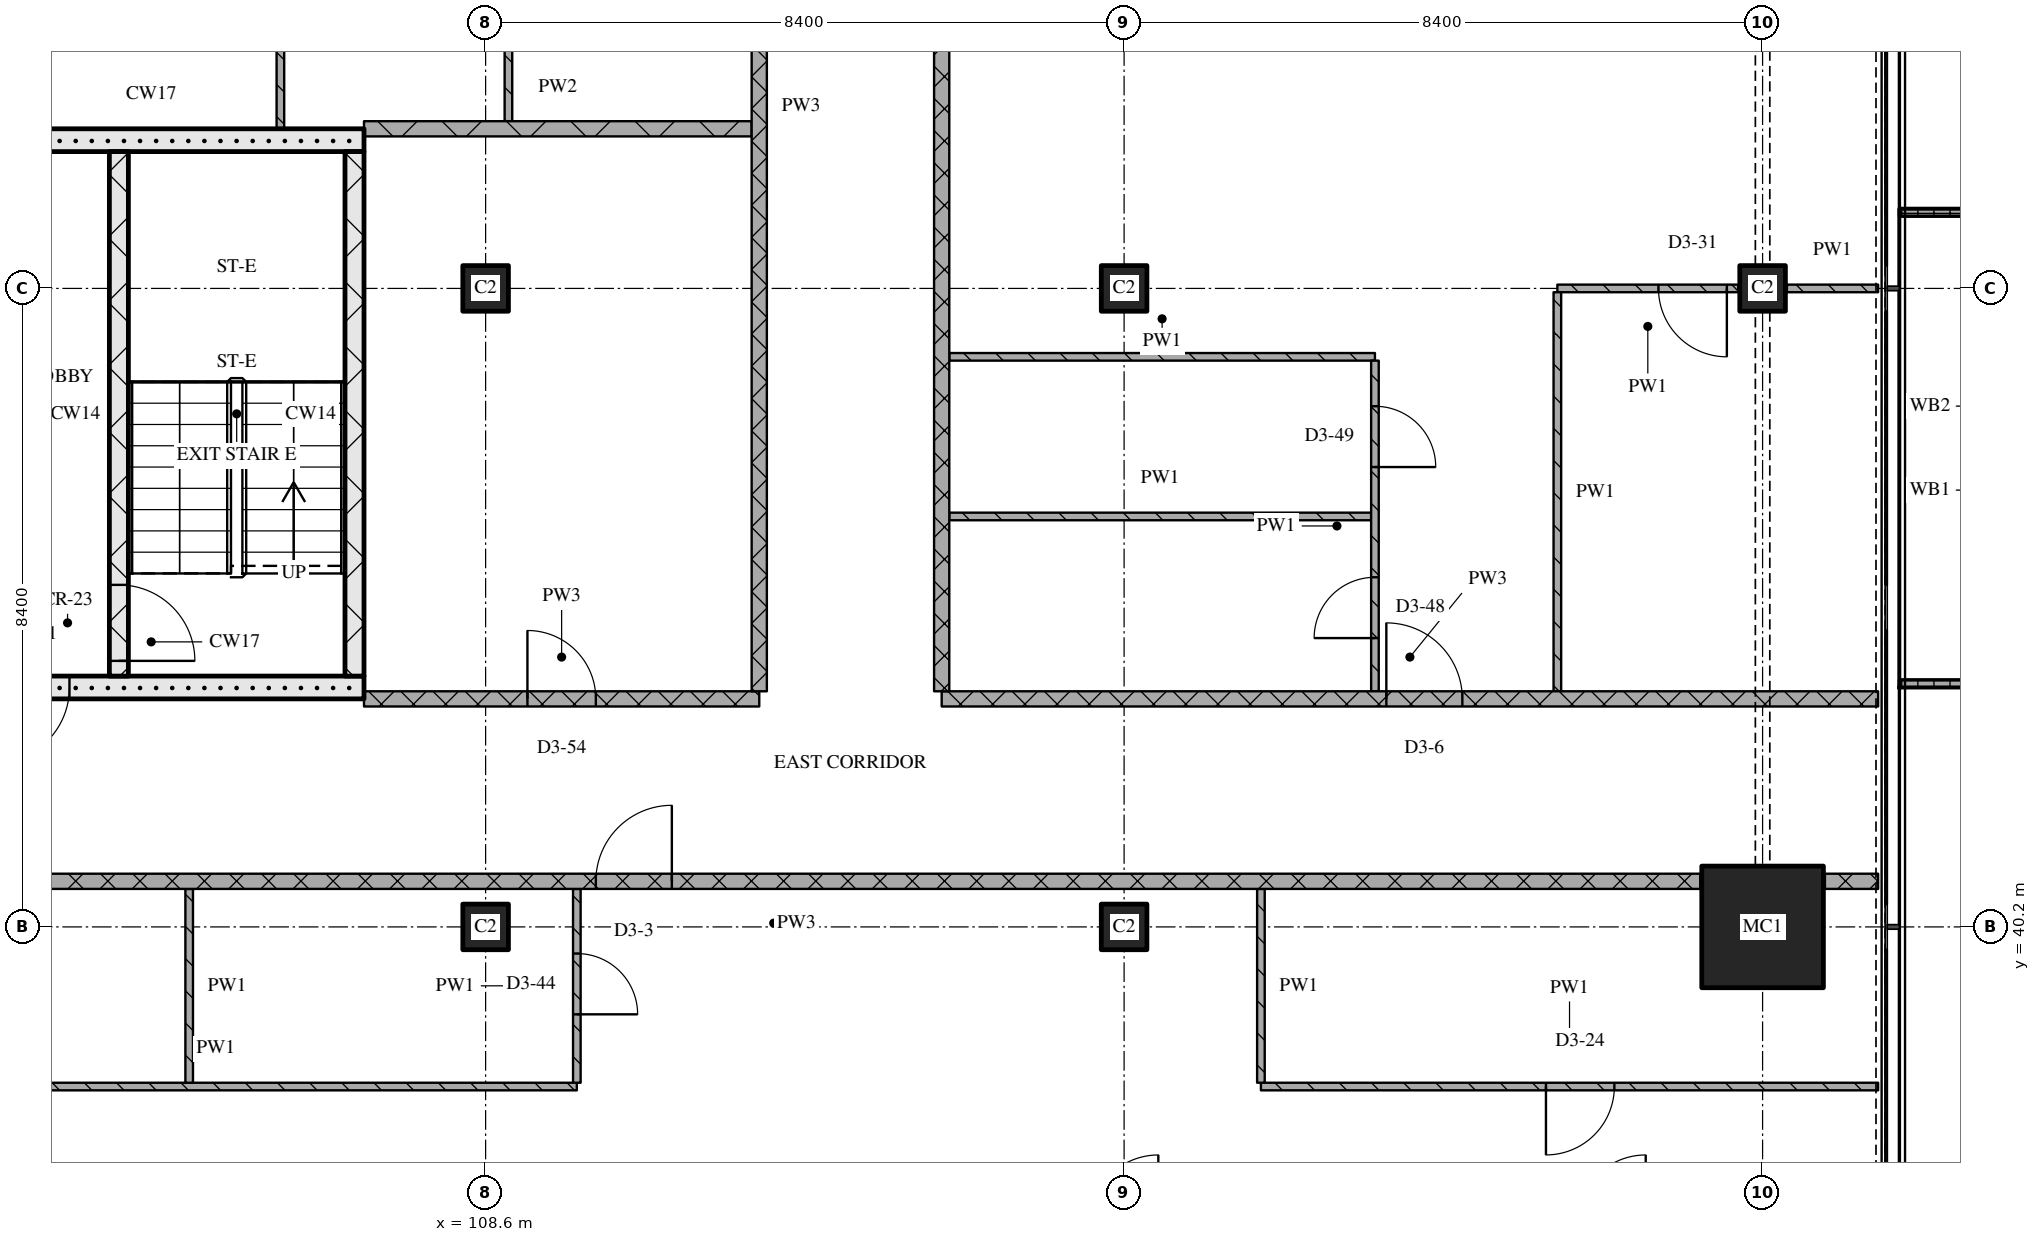
"""IFC4 building model, lengths in metres.
Left out: names, types, materials, properties, quantities, classifications, styles, units other than length and angle.
Written with IfcOpenShell. Run it as: python <this file> out.ifc"""

import sys

from ifc_helpers import new_model, si_unit, direction, frame, frame_2d, origin, origin_2d, place, context, subcontext, project, spatial, polyline, rectangle, outline, extrude, element, fill, save


model = new_model("IFC4")
c1 = context("Model", 3, precision=1e-05, world=origin(), true_north=direction((0.0, 1.0)))
c2 = subcontext(c1, "Body", "Model", "MODEL_VIEW")
j1 = project(units=[si_unit("LENGTHUNIT", "METRE"), si_unit("PLANEANGLEUNIT", "RADIAN")], contexts=[c1])
p1 = place(None, origin())
s1 = spatial("IfcSite", under=j1, at=p1, CompositionType="ELEMENT")
p2 = place(p1, origin())
s2 = spatial("IfcBuilding", under=s1, at=p2, CompositionType="ELEMENT")
p3 = place(p2, frame((0.0, 0.0, 234.3)))
s3 = spatial("IfcBuildingStorey", under=s2, at=p3, CompositionType="ELEMENT", Elevation=234.3)
for number, where, z_axis, x_axis in (
    (1, (108.6, 40.2, 0.0), (0.0, 0.0, 1.0), (1.0, 0.0, 0.0)),
    (2, (108.6, 48.6, 0.0), (0.0, 0.0, 1.0), (1.0, 0.0, 0.0)),
    (3, (117.0, 40.2, 0.0), (0.0, 0.0, 1.0), (1.0, 0.0, 0.0)),
    (4, (117.0, 48.6, 0.0), (0.0, 0.0, 1.0), (1.0, 0.0, 0.0)),
):
    element("IfcColumn", number, at=place(p3, frame(where, z_axis=z_axis, x_axis=x_axis)), inside=s3, PredefinedType="COLUMN", context=c2, shape_type="SweptSolid", body=[
        extrude(rectangle(XDim=0.6, YDim=0.6, at=origin_2d()), origin(), (0.0, 0.0, 1.0), 3.6),
    ])
p4 = place(p3, frame((125.4, 40.2, 0.0), z_axis=(0.0, 0.0, 1.0), x_axis=(1.0, 0.0, 0.0)))
e5 = element("IfcColumn", 5, at=p4, inside=s3, PredefinedType="COLUMN", context=c2, shape_type="SweptSolid", body=[
    extrude(rectangle(XDim=1.6, YDim=1.6, at=origin_2d()), origin(), (0.0, 0.0, 1.0), 3.6),
])
p5 = place(p3, frame((125.4, 48.6, 0.0), z_axis=(0.0, 0.0, 1.0), x_axis=(1.0, 0.0, 0.0)))
e6 = element("IfcColumn", 6, at=p5, inside=s3, PredefinedType="COLUMN", context=c2, shape_type="SweptSolid", body=[
    extrude(rectangle(XDim=0.6, YDim=0.6, at=origin_2d()), origin(), (0.0, 0.0, 1.0), 3.6),
])
p6 = place(p3, origin())
e7 = element("IfcWall", 7, at=p6, inside=s3, PredefinedType="SOLIDWALL", context=c2, shape_type="SweptSolid", body=[
    extrude(outline(polyline([(127.2, 43.35), (127.2, 43.45), (128.967, 43.45), (128.967, 49.55), (127.2, 49.55), (127.2, 49.65), (129.067, 49.65), (129.067, 43.35), (127.2, 43.35)])), origin(), (0.0, 0.0, 1.0), 1.0),
])
p7 = place(p3, frame((101.4, 43.35, 0.0), z_axis=(0.0, 0.0, 1.0), x_axis=(1.0, 0.0, 0.0)))
e8 = element("IfcWall", 8, at=p7, inside=s3, PredefinedType="SOLIDWALL", context=c2, shape_type="SweptSolid", body=[
    extrude(rectangle(XDim=5.6, YDim=0.3, at=frame_2d((2.8, 0.0))), origin(), (0.0, 0.0, 1.0), 3.32),
])
p8 = place(p7, frame((0.725, 0.0, 0.0)))
e9 = element("IfcOpeningElement", 9, at=p8, cuts=e8, PredefinedType="OPENING", context=c2, shape_type="SweptSolid", body=[
    extrude(rectangle(XDim=1.0, YDim=2.1, at=frame_2d((0.5, 1.05))), frame((0.0, 0.16, 0.0), z_axis=(0.0, -1.0, 0.0), x_axis=(1.0, 0.0, 0.0)), (0.0, 0.0, 1.0), 0.32),
])
p9 = place(p3, frame((103.775, 43.5, 0.0), z_axis=(0.0, 0.0, 1.0), x_axis=(0.0, 1.0, 0.0)))
e10 = element("IfcWall", 10, at=p9, inside=s3, PredefinedType="SOLIDWALL", context=c2, shape_type="SweptSolid", body=[
    extrude(rectangle(XDim=6.9, YDim=0.25, at=frame_2d((3.45, 0.0))), origin(), (0.0, 0.0, 1.0), 3.32),
])
p10 = place(p9, frame((0.2, 0.0, 0.0)))
e11 = element("IfcOpeningElement", 11, at=p10, cuts=e10, PredefinedType="OPENING", context=c2, shape_type="SweptSolid", body=[
    extrude(rectangle(XDim=1.0, YDim=2.1, at=frame_2d((0.5, 1.05))), frame((0.0, 0.135, 0.0), z_axis=(0.0, -1.0, 0.0), x_axis=(1.0, 0.0, 0.0)), (0.0, 0.0, 1.0), 0.27),
])
p11 = place(p3, frame((106.875, 43.5, 0.0), z_axis=(0.0, 0.0, 1.0), x_axis=(0.0, 1.0, 0.0)))
e12 = element("IfcWall", 12, at=p11, inside=s3, PredefinedType="SOLIDWALL", context=c2, shape_type="SweptSolid", body=[
    extrude(rectangle(XDim=6.9, YDim=0.25, at=frame_2d((3.45, 0.0))), origin(), (0.0, 0.0, 1.0), 3.32),
])
p12 = place(p3, frame((101.4, 50.55, 0.0), z_axis=(0.0, 0.0, 1.0), x_axis=(1.0, 0.0, 0.0)))
e13 = element("IfcWall", 13, at=p12, inside=s3, PredefinedType="SOLIDWALL", context=c2, shape_type="SweptSolid", body=[
    extrude(rectangle(XDim=5.6, YDim=0.3, at=frame_2d((2.8, 0.0))), origin(), (0.0, 0.0, 1.0), 3.32),
])
p13 = place(p3, frame((100.3, 38.1, 0.0), z_axis=(0.0, 0.0, 1.0), x_axis=(1.0, 0.0, 0.0)))
e14 = element("IfcWall", 14, at=p13, inside=s3, PredefinedType="PARTITIONING", context=c2, shape_type="SweptSolid", body=[
    extrude(rectangle(XDim=9.5, YDim=0.1, at=frame_2d((4.75, 0.0))), origin(), (0.0, 0.0, 1.0), 3.32),
])
p14 = place(p13, frame((1.75, 0.0, 0.0)))
e15 = element("IfcOpeningElement", 15, at=p14, cuts=e14, PredefinedType="OPENING", context=c2, shape_type="SweptSolid", body=[
    extrude(rectangle(XDim=0.8, YDim=2.1, at=frame_2d((0.4, 1.05))), frame((0.0, 0.06, 0.0), z_axis=(0.0, -1.0, 0.0), x_axis=(1.0, 0.0, 0.0)), (0.0, 0.0, 1.0), 0.12),
])
p15 = place(p3, frame((118.8, 38.1, 0.0), z_axis=(0.0, 0.0, 1.0), x_axis=(1.0, 0.0, 0.0)))
e16 = element("IfcWall", 16, at=p15, inside=s3, PredefinedType="PARTITIONING", context=c2, shape_type="SweptSolid", body=[
    extrude(rectangle(XDim=8.12, YDim=0.1, at=frame_2d((4.06, 0.0))), origin(), (0.0, 0.0, 1.0), 3.32),
])
p16 = place(p15, frame((3.75, 0.0, 0.0)))
e17 = element("IfcOpeningElement", 17, at=p16, cuts=e16, PredefinedType="OPENING", context=c2, shape_type="SweptSolid", body=[
    extrude(rectangle(XDim=0.9, YDim=2.1, at=frame_2d((0.45, 1.05))), frame((0.0, 0.06, 0.0), z_axis=(0.0, -1.0, 0.0), x_axis=(1.0, 0.0, 0.0)), (0.0, 0.0, 1.0), 0.12),
])
p17 = place(p3, frame((124.58, 40.8, 0.0), z_axis=(0.0, 0.0, 1.0), x_axis=(-1.0, 0.0, 0.0)))
e18 = element("IfcWall", 18, at=p17, inside=s3, PredefinedType="PARTITIONING", context=c2, shape_type="SweptSolid", body=[
    extrude(rectangle(XDim=24.38, YDim=0.2, at=frame_2d((12.19, 0.0))), origin(), (0.0, 0.0, 1.0), 3.32),
])
p18 = place(p17, frame((13.53, 0.0, 0.0)))
e19 = element("IfcOpeningElement", 19, at=p18, cuts=e18, PredefinedType="OPENING", context=c2, shape_type="SweptSolid", body=[
    extrude(rectangle(XDim=1.0, YDim=2.1, at=frame_2d((0.5, 1.05))), frame((0.0, 0.11, 0.0), z_axis=(0.0, -1.0, 0.0), x_axis=(1.0, 0.0, 0.0)), (0.0, 0.0, 1.0), 0.22),
])
p19 = place(p3, frame((126.22, 40.8, 0.0), z_axis=(0.0, 0.0, 1.0), x_axis=(1.0, 0.0, 0.0)))
e20 = element("IfcWall", 20, at=p19, inside=s3, PredefinedType="PARTITIONING", context=c2, shape_type="SweptSolid", body=[
    extrude(rectangle(XDim=0.7, YDim=0.2, at=frame_2d((0.35, 0.0))), origin(), (0.0, 0.0, 1.0), 3.32),
])
p20 = place(p3, frame((107.0, 43.2, 0.0), z_axis=(0.0, 0.0, 1.0), x_axis=(1.0, 0.0, 0.0)))
e21 = element("IfcWall", 21, at=p20, inside=s3, PredefinedType="PARTITIONING", context=c2, shape_type="SweptSolid", body=[
    extrude(rectangle(XDim=5.2, YDim=0.2, at=frame_2d((2.6, 0.0))), origin(), (0.0, 0.0, 1.0), 3.32),
])
p21 = place(p20, frame((2.15, 0.0, 0.0)))
e22 = element("IfcOpeningElement", 22, at=p21, cuts=e21, PredefinedType="OPENING", context=c2, shape_type="SweptSolid", body=[
    extrude(rectangle(XDim=0.9, YDim=2.1, at=frame_2d((0.45, 1.05))), frame((0.0, 0.11, 0.0), z_axis=(0.0, -1.0, 0.0), x_axis=(1.0, 0.0, 0.0)), (0.0, 0.0, 1.0), 0.22),
])
p22 = place(p3, frame((114.6, 43.2, 0.0), z_axis=(0.0, 0.0, 1.0), x_axis=(1.0, 0.0, 0.0)))
e23 = element("IfcWall", 23, at=p22, inside=s3, PredefinedType="PARTITIONING", context=c2, shape_type="SweptSolid", body=[
    extrude(rectangle(XDim=12.32, YDim=0.2, at=frame_2d((6.16, 0.0))), origin(), (0.0, 0.0, 1.0), 3.32),
])
p23 = place(p22, frame((5.85, 0.0, 0.0)))
e24 = element("IfcOpeningElement", 24, at=p23, cuts=e23, PredefinedType="OPENING", context=c2, shape_type="SweptSolid", body=[
    extrude(rectangle(XDim=1.0, YDim=2.1, at=frame_2d((0.5, 1.05))), frame((0.0, 0.11, 0.0), z_axis=(0.0, -1.0, 0.0), x_axis=(1.0, 0.0, 0.0)), (0.0, 0.0, 1.0), 0.22),
])
p24 = place(p3, frame((114.7, 45.6, 0.0), z_axis=(0.0, 0.0, 1.0), x_axis=(1.0, 0.0, 0.0)))
e25 = element("IfcWall", 25, at=p24, inside=s3, PredefinedType="PARTITIONING", context=c2, shape_type="SweptSolid", body=[
    extrude(rectangle(XDim=5.55, YDim=0.1, at=frame_2d((2.775, 0.0))), origin(), (0.0, 0.0, 1.0), 3.32),
])
p25 = place(p3, frame((114.7, 47.7, 0.0), z_axis=(0.0, 0.0, 1.0), x_axis=(1.0, 0.0, 0.0)))
e26 = element("IfcWall", 26, at=p25, inside=s3, PredefinedType="PARTITIONING", context=c2, shape_type="SweptSolid", body=[
    extrude(rectangle(XDim=5.6, YDim=0.1, at=frame_2d((2.8, 0.0))), origin(), (0.0, 0.0, 1.0), 3.32),
])
p26 = place(p3, frame((125.08, 48.6, 0.0), z_axis=(0.0, 0.0, 1.0), x_axis=(-1.0, 0.0, 0.0)))
e27 = element("IfcWall", 27, at=p26, inside=s3, PredefinedType="PARTITIONING", context=c2, shape_type="SweptSolid", body=[
    extrude(rectangle(XDim=2.38, YDim=0.1, at=frame_2d((1.19, 0.0))), origin(), (0.0, 0.0, 1.0), 3.32),
])
p27 = place(p26, frame((0.15, 0.0, 0.0)))
e28 = element("IfcOpeningElement", 28, at=p27, cuts=e27, PredefinedType="OPENING", context=c2, shape_type="SweptSolid", body=[
    extrude(rectangle(XDim=0.9, YDim=2.1, at=frame_2d((0.45, 1.05))), frame((0.0, 0.06, 0.0), z_axis=(0.0, -1.0, 0.0), x_axis=(1.0, 0.0, 0.0)), (0.0, 0.0, 1.0), 0.12),
])
p28 = place(p3, frame((125.72, 48.6, 0.0), z_axis=(0.0, 0.0, 1.0), x_axis=(1.0, 0.0, 0.0)))
e29 = element("IfcWall", 29, at=p28, inside=s3, PredefinedType="PARTITIONING", context=c2, shape_type="SweptSolid", body=[
    extrude(rectangle(XDim=1.2, YDim=0.1, at=frame_2d((0.6, 0.0))), origin(), (0.0, 0.0, 1.0), 3.32),
])
p29 = place(p3, frame((107.0, 50.7, 0.0), z_axis=(0.0, 0.0, 1.0), x_axis=(1.0, 0.0, 0.0)))
e30 = element("IfcWall", 30, at=p29, inside=s3, PredefinedType="PARTITIONING", context=c2, shape_type="SweptSolid", body=[
    extrude(rectangle(XDim=5.1, YDim=0.2, at=frame_2d((2.55, 0.0))), origin(), (0.0, 0.0, 1.0), 3.32),
])
p30 = place(p3, frame((104.7, 40.7, 0.0), z_axis=(0.0, 0.0, 1.0), x_axis=(0.0, -1.0, 0.0)))
e31 = element("IfcWall", 31, at=p30, inside=s3, PredefinedType="PARTITIONING", context=c2, shape_type="SweptSolid", body=[
    extrude(rectangle(XDim=2.55, YDim=0.1, at=frame_2d((1.275, 0.0))), origin(), (0.0, 0.0, 1.0), 3.32),
])
p31 = place(p3, frame((105.9, 54.7, 0.0), z_axis=(0.0, 0.0, 1.0), x_axis=(0.0, -1.0, 0.0)))
e32 = element("IfcWall", 32, at=p31, inside=s3, PredefinedType="PARTITIONING", context=c2, shape_type="SweptSolid", body=[
    extrude(rectangle(XDim=4.0, YDim=0.1, at=frame_2d((2.0, 0.0))), origin(), (0.0, 0.0, 1.0), 3.32),
])
p32 = place(p3, frame((108.9, 53.65, 0.0), z_axis=(0.0, 0.0, 1.0), x_axis=(0.0, -1.0, 0.0)))
e33 = element("IfcWall", 33, at=p32, inside=s3, PredefinedType="PARTITIONING", context=c2, shape_type="SweptSolid", body=[
    extrude(rectangle(XDim=2.85, YDim=0.1, at=frame_2d((1.425, 0.0))), origin(), (0.0, 0.0, 1.0), 3.32),
])
p33 = place(p3, frame((109.8, 38.15, 0.0), z_axis=(0.0, 0.0, 1.0), x_axis=(0.0, 1.0, 0.0)))
e34 = element("IfcWall", 34, at=p33, inside=s3, PredefinedType="PARTITIONING", context=c2, shape_type="SweptSolid", body=[
    extrude(rectangle(XDim=2.55, YDim=0.1, at=frame_2d((1.275, 0.0))), origin(), (0.0, 0.0, 1.0), 3.32),
])
p34 = place(p33, frame((0.9, 0.0, 0.0)))
e35 = element("IfcOpeningElement", 35, at=p34, cuts=e34, PredefinedType="OPENING", context=c2, shape_type="SweptSolid", body=[
    extrude(rectangle(XDim=0.8, YDim=2.1, at=frame_2d((0.4, 1.05))), frame((0.0, 0.06, 0.0), z_axis=(0.0, -1.0, 0.0), x_axis=(1.0, 0.0, 0.0)), (0.0, 0.0, 1.0), 0.12),
])
p35 = place(p3, frame((112.2, 58.7, 0.0), z_axis=(0.0, 0.0, 1.0), x_axis=(0.0, -1.0, 0.0)))
e36 = element("IfcWall", 36, at=p35, inside=s3, PredefinedType="PARTITIONING", context=c2, shape_type="SweptSolid", body=[
    extrude(rectangle(XDim=15.4, YDim=0.2, at=frame_2d((7.7, 0.0))), origin(), (0.0, 0.0, 1.0), 3.32),
])
p36 = place(p3, frame((114.6, 61.1, 0.0), z_axis=(0.0, 0.0, 1.0), x_axis=(0.0, -1.0, 0.0)))
e37 = element("IfcWall", 37, at=p36, inside=s3, PredefinedType="PARTITIONING", context=c2, shape_type="SweptSolid", body=[
    extrude(rectangle(XDim=17.8, YDim=0.2, at=frame_2d((8.9, 0.0))), origin(), (0.0, 0.0, 1.0), 3.32),
])
p37 = place(p3, frame((118.8, 40.7, 0.0), z_axis=(0.0, 0.0, 1.0), x_axis=(0.0, -1.0, 0.0)))
e38 = element("IfcWall", 38, at=p37, inside=s3, PredefinedType="PARTITIONING", context=c2, shape_type="SweptSolid", body=[
    extrude(rectangle(XDim=2.55, YDim=0.1, at=frame_2d((1.275, 0.0))), origin(), (0.0, 0.0, 1.0), 3.32),
])
p38 = place(p3, frame((120.3, 43.3, 0.0), z_axis=(0.0, 0.0, 1.0), x_axis=(0.0, 1.0, 0.0)))
e39 = element("IfcWall", 39, at=p38, inside=s3, PredefinedType="PARTITIONING", context=c2, shape_type="SweptSolid", body=[
    extrude(rectangle(XDim=4.35, YDim=0.1, at=frame_2d((2.175, 0.0))), origin(), (0.0, 0.0, 1.0), 3.32),
])
p39 = place(p38, frame((0.7, 0.0, 0.0)))
e40 = element("IfcOpeningElement", 40, at=p39, cuts=e39, PredefinedType="OPENING", context=c2, shape_type="SweptSolid", body=[
    extrude(rectangle(XDim=0.8, YDim=2.1, at=frame_2d((0.4, 1.05))), frame((0.0, 0.06, 0.0), z_axis=(0.0, -1.0, 0.0), x_axis=(1.0, 0.0, 0.0)), (0.0, 0.0, 1.0), 0.12),
])
p40 = place(p38, frame((2.95, 0.0, 0.0)))
e41 = element("IfcOpeningElement", 41, at=p40, cuts=e39, PredefinedType="OPENING", context=c2, shape_type="SweptSolid", body=[
    extrude(rectangle(XDim=0.8, YDim=2.1, at=frame_2d((0.4, 1.05))), frame((0.0, 0.06, 0.0), z_axis=(0.0, -1.0, 0.0), x_axis=(1.0, 0.0, 0.0)), (0.0, 0.0, 1.0), 0.12),
])
p41 = place(p3, frame((122.7, 48.55, 0.0), z_axis=(0.0, 0.0, 1.0), x_axis=(0.0, -1.0, 0.0)))
e42 = element("IfcWall", 42, at=p41, inside=s3, PredefinedType="PARTITIONING", context=c2, shape_type="SweptSolid", body=[
    extrude(rectangle(XDim=5.25, YDim=0.1, at=frame_2d((2.625, 0.0))), origin(), (0.0, 0.0, 1.0), 3.32),
])
p42 = place(p8, origin())
e43 = element("IfcDoor", 43, at=p42, inside=s3, OperationType="SINGLE_SWING_RIGHT", PredefinedType="DOOR", context=c2, shape_type="SweptSolid", body=[
    extrude(rectangle(XDim=1.0, YDim=2.1, at=frame_2d((0.5, 1.05))), frame((0.0, 0.025, 0.0), z_axis=(0.0, -1.0, 0.0), x_axis=(1.0, 0.0, 0.0)), (0.0, 0.0, 1.0), 0.05),
])
fill(e9, e43)
p43 = place(p10, origin())
e44 = element("IfcDoor", 44, at=p43, inside=s3, OperationType="SINGLE_SWING_RIGHT", PredefinedType="DOOR", context=c2, shape_type="SweptSolid", body=[
    extrude(rectangle(XDim=1.0, YDim=2.1, at=frame_2d((0.5, 1.05))), frame((0.0, 0.025, 0.0), z_axis=(0.0, -1.0, 0.0), x_axis=(1.0, 0.0, 0.0)), (0.0, 0.0, 1.0), 0.05),
])
fill(e11, e44)
p44 = place(p16, origin())
e45 = element("IfcDoor", 45, at=p44, inside=s3, OperationType="SINGLE_SWING_RIGHT", PredefinedType="DOOR", context=c2, shape_type="SweptSolid", body=[
    extrude(rectangle(XDim=0.9, YDim=2.1, at=frame_2d((0.45, 1.05))), frame((0.0, 0.025, 0.0), z_axis=(0.0, -1.0, 0.0), x_axis=(1.0, 0.0, 0.0)), (0.0, 0.0, 1.0), 0.05),
])
fill(e17, e45)
p45 = place(p18, origin())
e46 = element("IfcDoor", 46, at=p45, inside=s3, OperationType="SINGLE_SWING_RIGHT", PredefinedType="DOOR", context=c2, shape_type="SweptSolid", body=[
    extrude(rectangle(XDim=1.0, YDim=2.1, at=frame_2d((0.5, 1.05))), frame((0.0, 0.025, 0.0), z_axis=(0.0, -1.0, 0.0), x_axis=(1.0, 0.0, 0.0)), (0.0, 0.0, 1.0), 0.05),
])
fill(e19, e46)
p46 = place(p21, origin())
e47 = element("IfcDoor", 47, at=p46, inside=s3, OperationType="SINGLE_SWING_LEFT", PredefinedType="DOOR", context=c2, shape_type="SweptSolid", body=[
    extrude(rectangle(XDim=0.9, YDim=2.1, at=frame_2d((0.45, 1.05))), frame((0.0, 0.025, 0.0), z_axis=(0.0, -1.0, 0.0), x_axis=(1.0, 0.0, 0.0)), (0.0, 0.0, 1.0), 0.05),
])
fill(e22, e47)
p47 = place(p23, origin())
e48 = element("IfcDoor", 48, at=p47, inside=s3, OperationType="SINGLE_SWING_LEFT", PredefinedType="DOOR", context=c2, shape_type="SweptSolid", body=[
    extrude(rectangle(XDim=1.0, YDim=2.1, at=frame_2d((0.5, 1.05))), frame((0.0, 0.025, 0.0), z_axis=(0.0, -1.0, 0.0), x_axis=(1.0, 0.0, 0.0)), (0.0, 0.0, 1.0), 0.05),
])
fill(e24, e48)
p48 = place(p27, origin())
e49 = element("IfcDoor", 49, at=p48, inside=s3, OperationType="SINGLE_SWING_LEFT", PredefinedType="DOOR", context=c2, shape_type="SweptSolid", body=[
    extrude(rectangle(XDim=0.9, YDim=2.1, at=frame_2d((0.45, 1.05))), frame((0.0, 0.025, 0.0), z_axis=(0.0, -1.0, 0.0), x_axis=(1.0, 0.0, 0.0)), (0.0, 0.0, 1.0), 0.05),
])
fill(e28, e49)
p49 = place(p34, origin())
e50 = element("IfcDoor", 50, at=p49, inside=s3, OperationType="SINGLE_SWING_RIGHT", PredefinedType="DOOR", context=c2, shape_type="SweptSolid", body=[
    extrude(rectangle(XDim=0.8, YDim=2.1, at=frame_2d((0.4, 1.05))), frame((0.0, 0.025, 0.0), z_axis=(0.0, -1.0, 0.0), x_axis=(1.0, 0.0, 0.0)), (0.0, 0.0, 1.0), 0.05),
])
fill(e35, e50)
p50 = place(p39, origin())
e51 = element("IfcDoor", 51, at=p50, inside=s3, OperationType="SINGLE_SWING_LEFT", PredefinedType="DOOR", context=c2, shape_type="SweptSolid", body=[
    extrude(rectangle(XDim=0.8, YDim=2.1, at=frame_2d((0.4, 1.05))), frame((0.0, 0.025, 0.0), z_axis=(0.0, -1.0, 0.0), x_axis=(1.0, 0.0, 0.0)), (0.0, 0.0, 1.0), 0.05),
])
fill(e40, e51)
p51 = place(p40, origin())
e52 = element("IfcDoor", 52, at=p51, inside=s3, OperationType="SINGLE_SWING_RIGHT", PredefinedType="DOOR", context=c2, shape_type="SweptSolid", body=[
    extrude(rectangle(XDim=0.8, YDim=2.1, at=frame_2d((0.4, 1.05))), frame((0.0, 0.025, 0.0), z_axis=(0.0, -1.0, 0.0), x_axis=(1.0, 0.0, 0.0)), (0.0, 0.0, 1.0), 0.05),
])
fill(e41, e52)
save(model, sys.argv[1])
